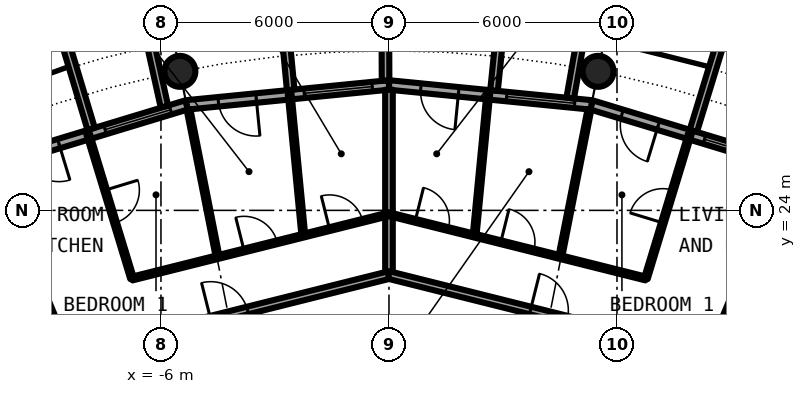
"""IFC4 building model, lengths in metres.
Left out: names, types, materials, properties, quantities, classifications, styles, units other than length and angle.
Written with IfcOpenShell. Run it as: python <this file> out.ifc"""

import sys

from ifc_helpers import new_model, si_unit, direction, frame, frame_2d, origin, origin_2d, place, context, subcontext, project, spatial, rectangle, circle, hollow_circle, extrude, element, fill, save


model = new_model("IFC4")
c1 = context("Model", 3, precision=1e-05, world=origin(), true_north=direction((0.0, 1.0)))
c2 = subcontext(c1, "Body", "Model", "MODEL_VIEW")
j1 = project(units=[si_unit("LENGTHUNIT", "METRE"), si_unit("PLANEANGLEUNIT", "RADIAN")], contexts=[c1])
p1 = place(None, origin())
s1 = spatial("IfcSite", under=j1, at=p1, CompositionType="ELEMENT")
p2 = place(p1, origin())
s2 = spatial("IfcBuilding", under=s1, at=p2, CompositionType="ELEMENT")
p3 = place(p2, frame((0.0, 0.0, 151.3)))
s3 = spatial("IfcBuildingStorey", under=s2, at=p3, CompositionType="ELEMENT", Elevation=151.3)
for number, where, z_axis, x_axis in (
    (1, (5.501, 27.658, 0.0), (0.0, 0.0, 1.0), (1.0, 0.0, 0.0)),
    (2, (-5.501, 27.658, 0.0), (0.0, 0.0, 1.0), (1.0, 0.0, 0.0)),
):
    element("IfcColumn", number, at=place(p3, frame(where, z_axis=z_axis, x_axis=x_axis)), inside=s3, PredefinedType="COLUMN", context=c2, shape_type="SweptSolid", body=[
        extrude(hollow_circle(Radius=0.406, WallThickness=0.04, at=origin_2d()), origin(), (0.0, 0.0, 1.0), 3.05),
    ])
p4 = place(p3, frame((10.447, 25.222, 0.0), z_axis=(0.0, 0.0, 1.0), x_axis=(-0.956965678721, 0.290201119486, 0.0)))
e3 = element("IfcWall", 3, at=p4, inside=s3, PredefinedType="SOLIDWALL", context=c2, shape_type="SweptSolid", body=[
    extrude(rectangle(XDim=5.351, YDim=0.25, at=frame_2d((2.676, 0.0))), origin(), (0.0, 0.0, 1.0), 2.7),
])
p5 = place(p4, frame((0.441, 0.0, 0.3)))
e4 = element("IfcOpeningElement", 4, at=p5, cuts=e3, PredefinedType="OPENING", context=c2, shape_type="SweptSolid", body=[
    extrude(rectangle(XDim=1.8, YDim=2.1, at=frame_2d((0.9, 1.05))), frame((0.0, 0.135, 0.0), z_axis=(0.0, -1.0, 0.0), x_axis=(1.0, 0.0, 0.0)), (0.0, 0.0, 1.0), 0.27),
])
p6 = place(p4, frame((3.51, 0.0, 0.0)))
e5 = element("IfcOpeningElement", 5, at=p6, cuts=e3, PredefinedType="OPENING", context=c2, shape_type="SweptSolid", body=[
    extrude(rectangle(XDim=1.0, YDim=2.2, at=frame_2d((0.5, 1.1))), frame((0.0, 0.135, 0.0), z_axis=(0.0, -1.0, 0.0), x_axis=(1.0, 0.0, 0.0)), (0.0, 0.0, 1.0), 0.27),
])
p7 = place(p3, frame((11.638, 28.084, -0.03), z_axis=(0.0, 0.0, 1.0), x_axis=(-0.941461077774, 0.337121697664, 0.0)))
e6 = element("IfcWall", 6, at=p7, inside=s3, PredefinedType="SOLIDWALL", context=c2, shape_type="SweptSolid", body=[
    extrude(rectangle(XDim=2.993, YDim=0.2, at=frame_2d((1.497, 0.0))), origin(), (0.0, 0.0, 1.0), 2.73),
])
p8 = place(p7, frame((0.457, 0.0, 0.33)))
e7 = element("IfcOpeningElement", 7, at=p8, cuts=e6, PredefinedType="OPENING", context=c2, shape_type="SweptSolid", body=[
    extrude(circle(Radius=1.04, at=frame_2d((1.04, 1.04))), frame((0.0, 0.11, 0.0), z_axis=(0.0, -1.0, 0.0), x_axis=(1.0, 0.0, 0.0)), (0.0, 0.0, 1.0), 0.22),
])
p9 = place(p3, frame((8.009, 26.092, -0.03), z_axis=(0.0, 0.0, 1.0), x_axis=(0.293406695073, 0.955987715029, 0.0)))
e8 = element("IfcWall", 8, at=p9, inside=s3, PredefinedType="SOLIDWALL", context=c2, shape_type="SweptSolid", body=[
    extrude(rectangle(XDim=3.006, YDim=0.2, at=frame_2d((1.503, 0.0))), origin(), (0.0, 0.0, 1.0), 2.73),
])
p10 = place(p3, frame((5.326, 26.775, 0.0), z_axis=(0.0, 0.0, 1.0), x_axis=(-0.995173996315, 0.098126026407, 0.0)))
e9 = element("IfcWall", 9, at=p10, inside=s3, PredefinedType="SOLIDWALL", context=c2, shape_type="SweptSolid", body=[
    extrude(rectangle(XDim=5.352, YDim=0.25, at=frame_2d((2.676, 0.0))), origin(), (0.0, 0.0, 1.0), 2.7),
])
p11 = place(p10, frame((0.441, 0.0, 0.3)))
e10 = element("IfcOpeningElement", 10, at=p11, cuts=e9, PredefinedType="OPENING", context=c2, shape_type="SweptSolid", body=[
    extrude(rectangle(XDim=1.8, YDim=2.1, at=frame_2d((0.9, 1.05))), frame((0.0, 0.135, 0.0), z_axis=(0.0, -1.0, 0.0), x_axis=(1.0, 0.0, 0.0)), (0.0, 0.0, 1.0), 0.27),
])
p12 = place(p10, frame((3.51, 0.0, 0.0)))
e11 = element("IfcOpeningElement", 11, at=p12, cuts=e9, PredefinedType="OPENING", context=c2, shape_type="SweptSolid", body=[
    extrude(rectangle(XDim=1.0, YDim=2.2, at=frame_2d((0.5, 1.1))), frame((0.0, 0.135, 0.0), z_axis=(0.0, -1.0, 0.0), x_axis=(1.0, 0.0, 0.0)), (0.0, 0.0, 1.0), 0.27),
])
p13 = place(p3, frame((4.769, 26.956, -0.03), z_axis=(0.0, 0.0, 1.0), x_axis=(0.174056778901, 0.984735618183, 0.0)))
e12 = element("IfcWall", 12, at=p13, inside=s3, PredefinedType="SOLIDWALL", context=c2, shape_type="SweptSolid", body=[
    extrude(rectangle(XDim=2.925, YDim=0.2, at=frame_2d((1.462, 0.0))), origin(), (0.0, 0.0, 1.0), 2.73),
])
p14 = place(p3, frame((2.764, 27.153, -0.03), z_axis=(0.0, 0.0, 1.0), x_axis=(0.101505487237, 0.994834979311, 0.0)))
e13 = element("IfcWall", 13, at=p14, inside=s3, PredefinedType="SOLIDWALL", context=c2, shape_type="SweptSolid", body=[
    extrude(rectangle(XDim=3.007, YDim=0.2, at=frame_2d((1.503, 0.0))), origin(), (0.0, 0.0, 1.0), 2.73),
])
p15 = place(p3, frame((0.0, 27.3, 0.0), z_axis=(0.0, 0.0, 1.0), x_axis=(-0.995173996315, -0.098126026407, 0.0)))
e14 = element("IfcWall", 14, at=p15, inside=s3, PredefinedType="SOLIDWALL", context=c2, shape_type="SweptSolid", body=[
    extrude(rectangle(XDim=5.352, YDim=0.25, at=frame_2d((2.676, 0.0))), origin(), (0.0, 0.0, 1.0), 2.7),
])
p16 = place(p15, frame((0.441, 0.0, 0.3)))
e15 = element("IfcOpeningElement", 15, at=p16, cuts=e14, PredefinedType="OPENING", context=c2, shape_type="SweptSolid", body=[
    extrude(rectangle(XDim=1.8, YDim=2.1, at=frame_2d((0.9, 1.05))), frame((0.0, 0.135, 0.0), z_axis=(0.0, -1.0, 0.0), x_axis=(1.0, 0.0, 0.0)), (0.0, 0.0, 1.0), 0.27),
])
p17 = place(p15, frame((3.51, 0.0, 0.0)))
e16 = element("IfcOpeningElement", 16, at=p17, cuts=e14, PredefinedType="OPENING", context=c2, shape_type="SweptSolid", body=[
    extrude(rectangle(XDim=1.0, YDim=2.2, at=frame_2d((0.5, 1.1))), frame((0.0, 0.135, 0.0), z_axis=(0.0, -1.0, 0.0), x_axis=(1.0, 0.0, 0.0)), (0.0, 0.0, 1.0), 0.27),
])
p18 = place(p3, frame((-0.09, 27.417, -0.03), z_axis=(0.0, 0.0, 1.0), x_axis=(-0.00347308367, 0.999993968827, 0.0)))
e17 = element("IfcWall", 17, at=p18, inside=s3, PredefinedType="SOLIDWALL", context=c2, shape_type="SweptSolid", body=[
    extrude(rectangle(XDim=2.882, YDim=0.2, at=frame_2d((1.441, 0.0))), origin(), (0.0, 0.0, 1.0), 2.73),
])
p19 = place(p3, frame((-2.586, 27.171, -0.03), z_axis=(0.0, 0.0, 1.0), x_axis=(-0.094548432284, 0.995520262954, 0.0)))
e18 = element("IfcWall", 18, at=p19, inside=s3, PredefinedType="SOLIDWALL", context=c2, shape_type="SweptSolid", body=[
    extrude(rectangle(XDim=3.006, YDim=0.2, at=frame_2d((1.503, 0.0))), origin(), (0.0, 0.0, 1.0), 2.73),
])
p20 = place(p3, frame((-5.326, 26.775, 0.0), z_axis=(0.0, 0.0, 1.0), x_axis=(-0.956965678721, -0.290201119486, 0.0)))
e19 = element("IfcWall", 19, at=p20, inside=s3, PredefinedType="SOLIDWALL", context=c2, shape_type="SweptSolid", body=[
    extrude(rectangle(XDim=5.351, YDim=0.25, at=frame_2d((2.676, 0.0))), origin(), (0.0, 0.0, 1.0), 2.7),
])
p21 = place(p20, frame((0.441, 0.0, 0.3)))
e20 = element("IfcOpeningElement", 20, at=p21, cuts=e19, PredefinedType="OPENING", context=c2, shape_type="SweptSolid", body=[
    extrude(rectangle(XDim=1.8, YDim=2.1, at=frame_2d((0.9, 1.05))), frame((0.0, 0.135, 0.0), z_axis=(0.0, -1.0, 0.0), x_axis=(1.0, 0.0, 0.0)), (0.0, 0.0, 1.0), 0.27),
])
p22 = place(p20, frame((3.51, 0.0, 0.0)))
e21 = element("IfcOpeningElement", 21, at=p22, cuts=e19, PredefinedType="OPENING", context=c2, shape_type="SweptSolid", body=[
    extrude(rectangle(XDim=1.0, YDim=2.2, at=frame_2d((0.5, 1.1))), frame((0.0, 0.135, 0.0), z_axis=(0.0, -1.0, 0.0), x_axis=(1.0, 0.0, 0.0)), (0.0, 0.0, 1.0), 0.27),
])
p23 = place(p3, frame((-5.909, 26.729, -0.03), z_axis=(0.0, 0.0, 1.0), x_axis=(-0.216409053917, 0.976302781612, 0.0)))
e22 = element("IfcWall", 22, at=p23, inside=s3, PredefinedType="SOLIDWALL", context=c2, shape_type="SweptSolid", body=[
    extrude(rectangle(XDim=2.925, YDim=0.2, at=frame_2d((1.463, 0.0))), origin(), (0.0, 0.0, 1.0), 2.73),
])
p24 = place(p3, frame((-7.837, 26.144, -0.03), z_axis=(0.0, 0.0, 1.0), x_axis=(-0.287064767992, 0.957911174889, 0.0)))
e23 = element("IfcWall", 23, at=p24, inside=s3, PredefinedType="SOLIDWALL", context=c2, shape_type="SweptSolid", body=[
    extrude(rectangle(XDim=3.006, YDim=0.2, at=frame_2d((1.503, 0.0))), origin(), (0.0, 0.0, 1.0), 2.73),
])
for number, where, z_axis, x_axis in (
    (24, (-9.013, 21.642, 0.0), (0.0, 0.0, 1.0), (0.384, -0.923, 0.0)),
    (25, (8.41, 20.193, 0.0), (0.0, 0.0, 1.0), (0.384, 0.923, 0.0)),
):
    element("IfcWall", number, at=place(p3, frame(where, z_axis=z_axis, x_axis=x_axis)), inside=s3, PredefinedType="PARTITIONING", context=c2, shape_type="SweptSolid", body=[
        extrude(rectangle(XDim=1.569, YDim=0.1, at=frame_2d((0.785, 0.0))), origin(), (0.0, 0.0, 1.0), 2.7),
    ])
p25 = place(p3, frame((-7.914, 25.997, 0.0), z_axis=(0.0, 0.0, 1.0), x_axis=(0.291291575636, -0.956634317785, 0.0)))
e26 = element("IfcWall", 26, at=p25, inside=s3, PredefinedType="PARTITIONING", context=c2, shape_type="SweptSolid", body=[
    extrude(rectangle(XDim=3.962, YDim=0.1, at=frame_2d((1.981, 0.0))), origin(), (0.0, 0.0, 1.0), 2.7),
])
p26 = place(p25, frame((1.531, 0.0, 0.0)))
e27 = element("IfcOpeningElement", 27, at=p26, cuts=e26, PredefinedType="OPENING", context=c2, shape_type="SweptSolid", body=[
    extrude(rectangle(XDim=0.9, YDim=2.3, at=frame_2d((0.45, 1.15))), frame((0.0, 0.06, 0.0), z_axis=(0.0, -1.0, 0.0), x_axis=(1.0, 0.0, 0.0)), (0.0, 0.0, 1.0), 0.12),
])
p27 = place(p3, frame((-5.276, 26.658, 0.0), z_axis=(0.0, 0.0, 1.0), x_axis=(0.194030211642, -0.980995554001, 0.0)))
e28 = element("IfcWall", 28, at=p27, inside=s3, PredefinedType="PARTITIONING", context=c2, shape_type="SweptSolid", body=[
    extrude(rectangle(XDim=3.962, YDim=0.1, at=frame_2d((1.981, 0.0))), origin(), (0.0, 0.0, 1.0), 2.7),
])
p28 = place(p3, frame((-2.612, 27.049, 0.0), z_axis=(0.0, 0.0, 1.0), x_axis=(0.09626981452, -0.995355274669, 0.0)))
e29 = element("IfcWall", 29, at=p28, inside=s3, PredefinedType="PARTITIONING", context=c2, shape_type="SweptSolid", body=[
    extrude(rectangle(XDim=3.73, YDim=0.1, at=frame_2d((1.865, 0.0))), origin(), (0.0, 0.0, 1.0), 2.7),
])
p29 = place(p3, frame((0.0, 22.3, 0.0), z_axis=(0.0, 0.0, 1.0), x_axis=(0.0, 1.0, 0.0)))
e30 = element("IfcWall", 30, at=p29, inside=s3, PredefinedType="PARTITIONING", context=c2, shape_type="SweptSolid", body=[
    extrude(rectangle(XDim=4.875, YDim=0.2, at=frame_2d((2.438, 0.0))), origin(), (0.0, 0.0, 1.0), 2.7),
])
p30 = place(p3, frame((2.253, 23.336, 0.0), z_axis=(0.0, 0.0, 1.0), x_axis=(0.09626981452, 0.995355274669, 0.0)))
e31 = element("IfcWall", 31, at=p30, inside=s3, PredefinedType="PARTITIONING", context=c2, shape_type="SweptSolid", body=[
    extrude(rectangle(XDim=3.73, YDim=0.1, at=frame_2d((1.865, 0.0))), origin(), (0.0, 0.0, 1.0), 2.7),
])
p31 = place(p3, frame((4.507, 22.771, 0.0), z_axis=(0.0, 0.0, 1.0), x_axis=(0.194030211642, 0.980995554001, 0.0)))
e32 = element("IfcWall", 32, at=p31, inside=s3, PredefinedType="PARTITIONING", context=c2, shape_type="SweptSolid", body=[
    extrude(rectangle(XDim=3.962, YDim=0.1, at=frame_2d((1.981, 0.0))), origin(), (0.0, 0.0, 1.0), 2.7),
])
p32 = place(p3, frame((6.76, 22.207, 0.0), z_axis=(0.0, 0.0, 1.0), x_axis=(0.291291575636, 0.956634317785, 0.0)))
e33 = element("IfcWall", 33, at=p32, inside=s3, PredefinedType="PARTITIONING", context=c2, shape_type="SweptSolid", body=[
    extrude(rectangle(XDim=3.962, YDim=0.1, at=frame_2d((1.981, 0.0))), origin(), (0.0, 0.0, 1.0), 2.7),
])
p33 = place(p32, frame((1.531, 0.0, 0.0)))
e34 = element("IfcOpeningElement", 34, at=p33, cuts=e33, PredefinedType="OPENING", context=c2, shape_type="SweptSolid", body=[
    extrude(rectangle(XDim=0.9, YDim=2.3, at=frame_2d((0.45, 1.15))), frame((0.0, 0.06, 0.0), z_axis=(0.0, -1.0, 0.0), x_axis=(1.0, 0.0, 0.0)), (0.0, 0.0, 1.0), 0.12),
])
p34 = place(p3, frame((-10.512, 19.667, 0.0), z_axis=(0.0, 0.0, 1.0), x_axis=(0.970086843848, 0.242758141765, 0.0)))
e35 = element("IfcWall", 35, at=p34, inside=s3, PredefinedType="PARTITIONING", context=c2, shape_type="SweptSolid", body=[
    extrude(rectangle(XDim=10.842, YDim=0.2, at=frame_2d((5.421, 0.0))), origin(), (0.0, 0.0, 1.0), 2.7),
])
p35 = place(p34, frame((6.002, 0.0, 0.0)))
e36 = element("IfcOpeningElement", 36, at=p35, cuts=e35, PredefinedType="OPENING", context=c2, shape_type="SweptSolid", body=[
    extrude(rectangle(XDim=1.0, YDim=2.3, at=frame_2d((0.5, 1.15))), frame((0.0, 0.11, 0.0), z_axis=(0.0, -1.0, 0.0), x_axis=(1.0, 0.0, 0.0)), (0.0, 0.0, 1.0), 0.22),
])
p36 = place(p3, frame((-0.006, 22.299, 0.0), z_axis=(0.0, 0.0, 1.0), x_axis=(0.970086843848, -0.242758141765, 0.0)))
e37 = element("IfcWall", 37, at=p36, inside=s3, PredefinedType="PARTITIONING", context=c2, shape_type="SweptSolid", body=[
    extrude(rectangle(XDim=10.842, YDim=0.2, at=frame_2d((5.421, 0.0))), origin(), (0.0, 0.0, 1.0), 2.7),
])
p37 = place(p36, frame((3.841, 0.0, 0.0)))
e38 = element("IfcOpeningElement", 38, at=p37, cuts=e37, PredefinedType="OPENING", context=c2, shape_type="SweptSolid", body=[
    extrude(rectangle(XDim=1.0, YDim=2.3, at=frame_2d((0.5, 1.15))), frame((0.0, 0.11, 0.0), z_axis=(0.0, -1.0, 0.0), x_axis=(1.0, 0.0, 0.0)), (0.0, 0.0, 1.0), 0.22),
])
p38 = place(p3, frame((-6.76, 22.206, 0.0), z_axis=(0.0, 0.0, 1.0), x_axis=(0.970070358667, 0.242824008772, 0.0)))
e39 = element("IfcWall", 39, at=p38, inside=s3, PredefinedType="PARTITIONING", context=c2, shape_type="SweptSolid", body=[
    extrude(rectangle(XDim=6.972, YDim=0.1, at=frame_2d((3.486, 0.0))), origin(), (0.0, 0.0, 1.0), 2.7),
])
p39 = place(p38, frame((3.037, 0.0, 0.0)))
e40 = element("IfcOpeningElement", 40, at=p39, cuts=e39, PredefinedType="OPENING", context=c2, shape_type="SweptSolid", body=[
    extrude(rectangle(XDim=0.9, YDim=2.3, at=frame_2d((0.45, 1.15))), frame((0.0, 0.06, 0.0), z_axis=(0.0, -1.0, 0.0), x_axis=(1.0, 0.0, 0.0)), (0.0, 0.0, 1.0), 0.12),
])
p40 = place(p38, frame((5.357, 0.0, 0.0)))
e41 = element("IfcOpeningElement", 41, at=p40, cuts=e39, PredefinedType="OPENING", context=c2, shape_type="SweptSolid", body=[
    extrude(rectangle(XDim=0.9, YDim=2.3, at=frame_2d((0.45, 1.15))), frame((0.0, 0.06, 0.0), z_axis=(0.0, -1.0, 0.0), x_axis=(1.0, 0.0, 0.0)), (0.0, 0.0, 1.0), 0.12),
])
p41 = place(p3, frame((-0.003, 23.899, 0.0), z_axis=(0.0, 0.0, 1.0), x_axis=(0.970070358667, -0.242824008772, 0.0)))
e42 = element("IfcWall", 42, at=p41, inside=s3, PredefinedType="PARTITIONING", context=c2, shape_type="SweptSolid", body=[
    extrude(rectangle(XDim=6.972, YDim=0.1, at=frame_2d((3.486, 0.0))), origin(), (0.0, 0.0, 1.0), 2.7),
])
p42 = place(p41, frame((3.035, 0.0, 0.0)))
e43 = element("IfcOpeningElement", 43, at=p42, cuts=e42, PredefinedType="OPENING", context=c2, shape_type="SweptSolid", body=[
    extrude(rectangle(XDim=0.9, YDim=2.3, at=frame_2d((0.45, 1.15))), frame((0.0, 0.06, 0.0), z_axis=(0.0, -1.0, 0.0), x_axis=(1.0, 0.0, 0.0)), (0.0, 0.0, 1.0), 0.12),
])
p43 = place(p41, frame((0.715, 0.0, 0.0)))
e44 = element("IfcOpeningElement", 44, at=p43, cuts=e42, PredefinedType="OPENING", context=c2, shape_type="SweptSolid", body=[
    extrude(rectangle(XDim=0.9, YDim=2.3, at=frame_2d((0.45, 1.15))), frame((0.0, 0.06, 0.0), z_axis=(0.0, -1.0, 0.0), x_axis=(1.0, 0.0, 0.0)), (0.0, 0.0, 1.0), 0.12),
])
p44 = place(p5, origin())
e45 = element("IfcWindow", 45, at=p44, inside=s3, PartitioningType="SINGLE_PANEL", PredefinedType="WINDOW", context=c2, shape_type="SweptSolid", body=[
    extrude(rectangle(XDim=1.8, YDim=2.1, at=frame_2d((0.9, 1.05))), frame((0.0, 0.03, 0.0), z_axis=(0.0, -1.0, 0.0), x_axis=(1.0, 0.0, 0.0)), (0.0, 0.0, 1.0), 0.06),
])
fill(e4, e45)
p45 = place(p6, origin())
e46 = element("IfcDoor", 46, at=p45, inside=s3, OperationType="SINGLE_SWING_LEFT", PredefinedType="DOOR", context=c2, shape_type="SweptSolid", body=[
    extrude(rectangle(XDim=1.0, YDim=2.2, at=frame_2d((0.5, 1.1))), frame((0.0, 0.025, 0.0), z_axis=(0.0, -1.0, 0.0), x_axis=(1.0, 0.0, 0.0)), (0.0, 0.0, 1.0), 0.05),
])
fill(e5, e46)
p46 = place(p11, origin())
e47 = element("IfcWindow", 47, at=p46, inside=s3, PartitioningType="SINGLE_PANEL", PredefinedType="WINDOW", context=c2, shape_type="SweptSolid", body=[
    extrude(rectangle(XDim=1.8, YDim=2.1, at=frame_2d((0.9, 1.05))), frame((0.0, 0.03, 0.0), z_axis=(0.0, -1.0, 0.0), x_axis=(1.0, 0.0, 0.0)), (0.0, 0.0, 1.0), 0.06),
])
fill(e10, e47)
p47 = place(p12, origin())
e48 = element("IfcDoor", 48, at=p47, inside=s3, OperationType="SINGLE_SWING_LEFT", PredefinedType="DOOR", context=c2, shape_type="SweptSolid", body=[
    extrude(rectangle(XDim=1.0, YDim=2.2, at=frame_2d((0.5, 1.1))), frame((0.0, 0.025, 0.0), z_axis=(0.0, -1.0, 0.0), x_axis=(1.0, 0.0, 0.0)), (0.0, 0.0, 1.0), 0.05),
])
fill(e11, e48)
p48 = place(p16, origin())
e49 = element("IfcWindow", 49, at=p48, inside=s3, PartitioningType="SINGLE_PANEL", PredefinedType="WINDOW", context=c2, shape_type="SweptSolid", body=[
    extrude(rectangle(XDim=1.8, YDim=2.1, at=frame_2d((0.9, 1.05))), frame((0.0, 0.03, 0.0), z_axis=(0.0, -1.0, 0.0), x_axis=(1.0, 0.0, 0.0)), (0.0, 0.0, 1.0), 0.06),
])
fill(e15, e49)
p49 = place(p17, origin())
e50 = element("IfcDoor", 50, at=p49, inside=s3, OperationType="SINGLE_SWING_LEFT", PredefinedType="DOOR", context=c2, shape_type="SweptSolid", body=[
    extrude(rectangle(XDim=1.0, YDim=2.2, at=frame_2d((0.5, 1.1))), frame((0.0, 0.025, 0.0), z_axis=(0.0, -1.0, 0.0), x_axis=(1.0, 0.0, 0.0)), (0.0, 0.0, 1.0), 0.05),
])
fill(e16, e50)
p50 = place(p21, origin())
e51 = element("IfcWindow", 51, at=p50, inside=s3, PartitioningType="SINGLE_PANEL", PredefinedType="WINDOW", context=c2, shape_type="SweptSolid", body=[
    extrude(rectangle(XDim=1.8, YDim=2.1, at=frame_2d((0.9, 1.05))), frame((0.0, 0.03, 0.0), z_axis=(0.0, -1.0, 0.0), x_axis=(1.0, 0.0, 0.0)), (0.0, 0.0, 1.0), 0.06),
])
fill(e20, e51)
p51 = place(p22, origin())
e52 = element("IfcDoor", 52, at=p51, inside=s3, OperationType="SINGLE_SWING_LEFT", PredefinedType="DOOR", context=c2, shape_type="SweptSolid", body=[
    extrude(rectangle(XDim=1.0, YDim=2.2, at=frame_2d((0.5, 1.1))), frame((0.0, 0.025, 0.0), z_axis=(0.0, -1.0, 0.0), x_axis=(1.0, 0.0, 0.0)), (0.0, 0.0, 1.0), 0.05),
])
fill(e21, e52)
p52 = place(p37, origin())
e53 = element("IfcDoor", 53, at=p52, inside=s3, OperationType="SINGLE_SWING_LEFT", PredefinedType="DOOR", context=c2, shape_type="SweptSolid", body=[
    extrude(rectangle(XDim=1.0, YDim=2.3, at=frame_2d((0.5, 1.15))), frame((0.0, 0.025, 0.0), z_axis=(0.0, -1.0, 0.0), x_axis=(1.0, 0.0, 0.0)), (0.0, 0.0, 1.0), 0.05),
])
fill(e38, e53)
p53 = place(p33, origin())
e54 = element("IfcDoor", 54, at=p53, inside=s3, OperationType="SINGLE_SWING_RIGHT", PredefinedType="DOOR", context=c2, shape_type="SweptSolid", body=[
    extrude(rectangle(XDim=0.9, YDim=2.3, at=frame_2d((0.45, 1.15))), frame((0.0, 0.025, 0.0), z_axis=(0.0, -1.0, 0.0), x_axis=(1.0, 0.0, 0.0)), (0.0, 0.0, 1.0), 0.05),
])
fill(e34, e54)
p54 = place(p42, origin())
e55 = element("IfcDoor", 55, at=p54, inside=s3, OperationType="SINGLE_SWING_LEFT", PredefinedType="DOOR", context=c2, shape_type="SweptSolid", body=[
    extrude(rectangle(XDim=0.9, YDim=2.3, at=frame_2d((0.45, 1.15))), frame((0.0, 0.025, 0.0), z_axis=(0.0, -1.0, 0.0), x_axis=(1.0, 0.0, 0.0)), (0.0, 0.0, 1.0), 0.05),
])
fill(e43, e55)
p55 = place(p43, origin())
e56 = element("IfcDoor", 56, at=p55, inside=s3, OperationType="SINGLE_SWING_LEFT", PredefinedType="DOOR", context=c2, shape_type="SweptSolid", body=[
    extrude(rectangle(XDim=0.9, YDim=2.3, at=frame_2d((0.45, 1.15))), frame((0.0, 0.025, 0.0), z_axis=(0.0, -1.0, 0.0), x_axis=(1.0, 0.0, 0.0)), (0.0, 0.0, 1.0), 0.05),
])
fill(e44, e56)
p56 = place(p35, origin())
e57 = element("IfcDoor", 57, at=p56, inside=s3, OperationType="SINGLE_SWING_RIGHT", PredefinedType="DOOR", context=c2, shape_type="SweptSolid", body=[
    extrude(rectangle(XDim=1.0, YDim=2.3, at=frame_2d((0.5, 1.15))), frame((0.0, 0.025, 0.0), z_axis=(0.0, -1.0, 0.0), x_axis=(1.0, 0.0, 0.0)), (0.0, 0.0, 1.0), 0.05),
])
fill(e36, e57)
p57 = place(p26, origin())
e58 = element("IfcDoor", 58, at=p57, inside=s3, OperationType="SINGLE_SWING_RIGHT", PredefinedType="DOOR", context=c2, shape_type="SweptSolid", body=[
    extrude(rectangle(XDim=0.9, YDim=2.3, at=frame_2d((0.45, 1.15))), frame((0.0, 0.025, 0.0), z_axis=(0.0, -1.0, 0.0), x_axis=(1.0, 0.0, 0.0)), (0.0, 0.0, 1.0), 0.05),
])
fill(e27, e58)
p58 = place(p39, origin())
e59 = element("IfcDoor", 59, at=p58, inside=s3, OperationType="SINGLE_SWING_RIGHT", PredefinedType="DOOR", context=c2, shape_type="SweptSolid", body=[
    extrude(rectangle(XDim=0.9, YDim=2.3, at=frame_2d((0.45, 1.15))), frame((0.0, 0.025, 0.0), z_axis=(0.0, -1.0, 0.0), x_axis=(1.0, 0.0, 0.0)), (0.0, 0.0, 1.0), 0.05),
])
fill(e40, e59)
p59 = place(p40, origin())
e60 = element("IfcDoor", 60, at=p59, inside=s3, OperationType="SINGLE_SWING_RIGHT", PredefinedType="DOOR", context=c2, shape_type="SweptSolid", body=[
    extrude(rectangle(XDim=0.9, YDim=2.3, at=frame_2d((0.45, 1.15))), frame((0.0, 0.025, 0.0), z_axis=(0.0, -1.0, 0.0), x_axis=(1.0, 0.0, 0.0)), (0.0, 0.0, 1.0), 0.05),
])
fill(e41, e60)
save(model, sys.argv[1])
